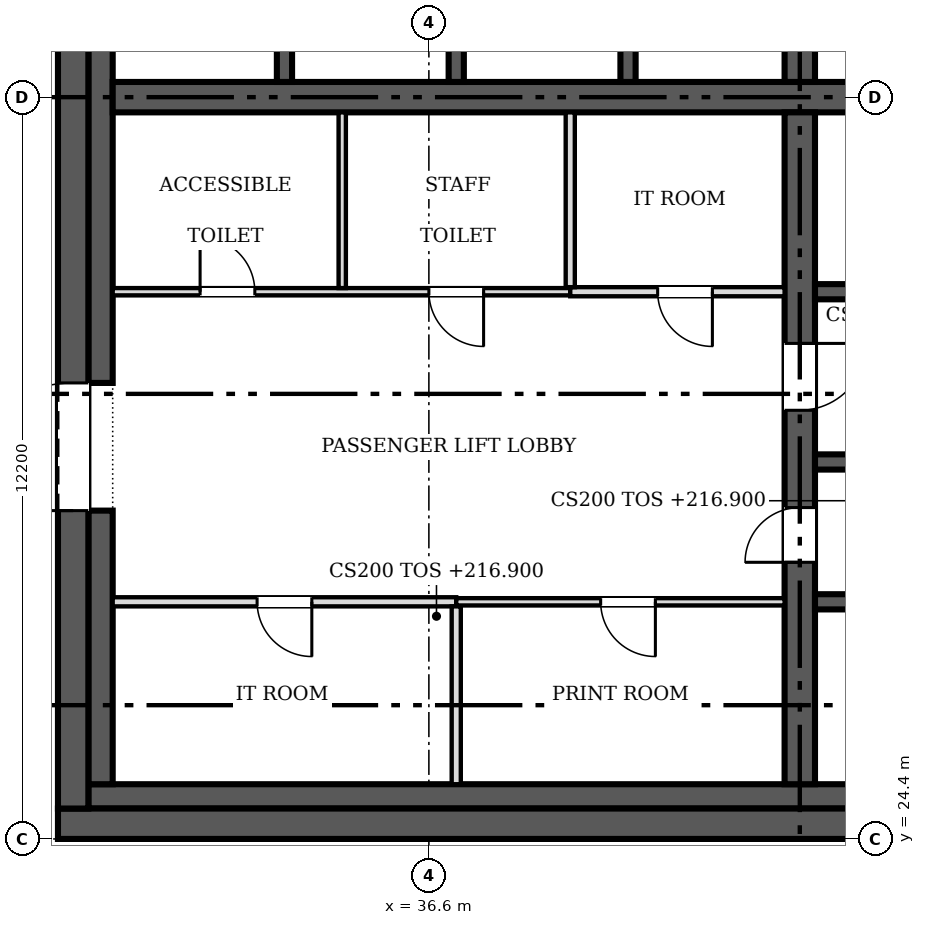
"""IFC4 building model, lengths in metres.
Left out: names, types, materials, properties, quantities, classifications, styles, units other than length and angle.
Written with IfcOpenShell. Run it as: python <this file> out.ifc"""

import sys

from ifc_helpers import new_model, si_unit, direction, frame, frame_2d, origin, place, context, subcontext, project, spatial, rectangle, extrude, source, transform, mapped, element, fill, save


model = new_model("IFC4")
c1 = context("Model", 3, precision=1e-05, world=origin(), true_north=direction((0.0, 1.0)))
c2 = subcontext(c1, "Body", "Model", "MODEL_VIEW")
j1 = project(units=[si_unit("LENGTHUNIT", "METRE"), si_unit("PLANEANGLEUNIT", "RADIAN")], contexts=[c1])
p1 = place(None, origin())
s1 = spatial("IfcSite", under=j1, at=p1, CompositionType="ELEMENT")
p2 = place(p1, origin())
s2 = spatial("IfcBuilding", under=s1, at=p2, CompositionType="ELEMENT")
p3 = place(p2, frame((0.0, 0.0, 216.9)))
s3 = spatial("IfcBuildingStorey", under=s2, at=p3, CompositionType="ELEMENT", Elevation=216.9)
p4 = place(p3, frame((54.9, 24.65, 0.0), z_axis=(0.0, 0.0, 1.0), x_axis=(-1.0, 0.0, 0.0)))
e1 = element("IfcWall", 1, at=p4, inside=s3, PredefinedType="SHEAR", context=c2, shape_type="SweptSolid", body=[
    extrude(rectangle(XDim=24.4, YDim=0.5, at=frame_2d((12.2, 0.0))), origin(), (0.0, 0.0, 1.0), 3.8),
])
m1 = source(origin(), c2, "Body", "SweptSolid", [
    extrude(rectangle(XDim=1.2, YDim=2.1, at=frame_2d((0.6, 1.05))), frame((0.0, 0.26, 0.0), z_axis=(0.0, -1.0, 0.0), x_axis=(1.0, 0.0, 0.0)), (0.0, 0.0, 1.0), 0.52),
])
p5 = place(p4, frame((1.5, 0.0, 0.0)))
e2 = element("IfcOpeningElement", 2, at=p5, cuts=e1, PredefinedType="OPENING", context=c2, shape_type="MappedRepresentation", body=[
    mapped(m1, transform((0.0, 0.0, 0.0), scale=1.0)),
])
p6 = place(p3, frame((30.75, 24.9, 0.0), z_axis=(0.0, 0.0, 1.0), x_axis=(0.0, 1.0, 0.0)))
e3 = element("IfcWall", 3, at=p6, inside=s3, PredefinedType="SHEAR", context=c2, shape_type="SweptSolid", body=[
    extrude(rectangle(XDim=23.4, YDim=0.5, at=frame_2d((11.7, 0.0))), origin(), (0.0, 0.0, 1.0), 3.8),
])
m2 = source(origin(), c2, "Body", "SweptSolid", [
    extrude(rectangle(XDim=2.1, YDim=2.4, at=frame_2d((1.05, 1.2))), frame((0.0, 0.26, 0.0), z_axis=(0.0, -1.0, 0.0), x_axis=(1.0, 0.0, 0.0)), (0.0, 0.0, 1.0), 0.52),
])
p7 = place(p6, frame((4.9, 0.0, 0.0)))
e4 = element("IfcOpeningElement", 4, at=p7, cuts=e3, PredefinedType="OPENING", context=c2, shape_type="MappedRepresentation", body=[
    mapped(m2, transform((0.0, 0.0, 0.0), scale=1.0)),
])
p8 = place(p6, frame((16.4, 0.0, 0.0)))
e5 = element("IfcOpeningElement", 5, at=p8, cuts=e3, PredefinedType="OPENING", context=c2, shape_type="MappedRepresentation", body=[
    mapped(m2, transform((0.0, 0.0, 0.0), scale=1.0)),
])
p9 = place(p3, frame((31.0, 25.1, 0.0), z_axis=(0.0, 0.0, 1.0), x_axis=(1.0, 0.0, 0.0)))
e6 = element("IfcWall", 6, at=p9, inside=s3, PredefinedType="SOLIDWALL", context=c2, shape_type="SweptSolid", body=[
    extrude(rectangle(XDim=21.2, YDim=0.4, at=frame_2d((10.6, 0.0))), origin(), (0.0, 0.0, 1.0), 3.8),
])
p10 = place(p3, frame((31.2, 25.3, 0.0), z_axis=(0.0, 0.0, 1.0), x_axis=(0.0, 1.0, 0.0)))
e7 = element("IfcWall", 7, at=p10, inside=s3, PredefinedType="SOLIDWALL", context=c2, shape_type="SweptSolid", body=[
    extrude(rectangle(XDim=4.5, YDim=0.4, at=frame_2d((2.25, 0.0))), origin(), (0.0, 0.0, 1.0), 3.8),
])
p11 = place(p3, frame((31.2, 31.9, 0.0), z_axis=(0.0, 0.0, 1.0), x_axis=(0.0, 1.0, 0.0)))
e8 = element("IfcWall", 8, at=p11, inside=s3, PredefinedType="SOLIDWALL", context=c2, shape_type="SweptSolid", body=[
    extrude(rectangle(XDim=9.4, YDim=0.4, at=frame_2d((4.7, 0.0))), origin(), (0.0, 0.0, 1.0), 3.8),
])
p12 = place(p3, frame((31.4, 36.6, 0.0), z_axis=(0.0, 0.0, 1.0), x_axis=(1.0, 0.0, 0.0)))
e9 = element("IfcWall", 9, at=p12, inside=s3, PredefinedType="SHEAR", context=c2, shape_type="SweptSolid", body=[
    extrude(rectangle(XDim=16.95, YDim=0.5, at=frame_2d((8.475, 0.0))), origin(), (0.0, 0.0, 1.0), 3.8),
])
p13 = place(p3, frame((42.7, 36.35, 0.0), z_axis=(0.0, 0.0, 1.0), x_axis=(0.0, -1.0, 0.0)))
e10 = element("IfcWall", 10, at=p13, inside=s3, PredefinedType="SHEAR", context=c2, shape_type="SweptSolid", body=[
    extrude(rectangle(XDim=11.05, YDim=0.5, at=frame_2d((5.525, 0.0))), origin(), (0.0, 0.0, 1.0), 3.8),
])
m3 = source(origin(), c2, "Body", "SweptSolid", [
    extrude(rectangle(XDim=0.9, YDim=2.1, at=frame_2d((0.45, 1.05))), frame((0.0, 0.26, 0.0), z_axis=(0.0, -1.0, 0.0), x_axis=(1.0, 0.0, 0.0)), (0.0, 0.0, 1.0), 0.52),
])
p14 = place(p13, frame((6.5, 0.0, 0.0)))
e11 = element("IfcOpeningElement", 11, at=p14, cuts=e10, PredefinedType="OPENING", context=c2, shape_type="MappedRepresentation", body=[
    mapped(m3, transform((0.0, 0.0, 0.0), scale=1.0)),
])
m4 = source(origin(), c2, "Body", "SweptSolid", [
    extrude(rectangle(XDim=1.1, YDim=2.1, at=frame_2d((0.55, 1.05))), frame((0.0, 0.26, 0.0), z_axis=(0.0, -1.0, 0.0), x_axis=(1.0, 0.0, 0.0)), (0.0, 0.0, 1.0), 0.52),
])
p15 = place(p13, frame((3.8, 0.0, 0.0)))
e12 = element("IfcOpeningElement", 12, at=p15, cuts=e10, PredefinedType="OPENING", context=c2, shape_type="MappedRepresentation", body=[
    mapped(m4, transform((0.0, 0.0, 0.0), scale=1.0)),
])
p16 = place(p3, frame((42.7, 36.85, 0.0), z_axis=(0.0, 0.0, 1.0), x_axis=(0.0, 1.0, 0.0)))
e13 = element("IfcWall", 13, at=p16, inside=s3, PredefinedType="SHEAR", context=c2, shape_type="SweptSolid", body=[
    extrude(rectangle(XDim=2.95, YDim=0.5, at=frame_2d((1.475, 0.0))), origin(), (0.0, 0.0, 1.0), 3.8),
])
p17 = place(p3, frame((48.225, 33.4, 0.0), z_axis=(0.0, 0.0, 1.0), x_axis=(-1.0, 0.0, 0.0)))
e14 = element("IfcWall", 14, at=p17, inside=s3, PredefinedType="SOLIDWALL", context=c2, shape_type="SweptSolid", body=[
    extrude(rectangle(XDim=5.275, YDim=0.25, at=frame_2d((2.638, 0.0))), origin(), (0.0, 0.0, 1.0), 3.8),
])
m5 = source(origin(), c2, "Body", "SweptSolid", [
    extrude(rectangle(XDim=1.2, YDim=2.1, at=frame_2d((0.6, 1.05))), frame((0.0, 0.135, 0.0), z_axis=(0.0, -1.0, 0.0), x_axis=(1.0, 0.0, 0.0)), (0.0, 0.0, 1.0), 0.27),
])
p18 = place(p17, frame((3.512, 0.0, 0.0)))
e15 = element("IfcOpeningElement", 15, at=p18, cuts=e14, PredefinedType="OPENING", context=c2, shape_type="MappedRepresentation", body=[
    mapped(m5, transform((0.0, 0.0, 0.0), scale=1.0)),
])
p19 = place(p17, frame((0.688, 0.0, 0.0)))
e16 = element("IfcOpeningElement", 16, at=p19, cuts=e14, PredefinedType="OPENING", context=c2, shape_type="MappedRepresentation", body=[
    mapped(m5, transform((0.0, 0.0, 0.0), scale=1.0)),
])
for number, where, z_axis, x_axis in (
    (17, (42.95, 28.3, 0.0), (0.0, 0.0, 1.0), (1.0, 0.0, 0.0)),
    (18, (42.95, 30.6, 0.0), (0.0, 0.0, 1.0), (1.0, 0.0, 0.0)),
):
    element("IfcWall", number, at=place(p3, frame(where, z_axis=z_axis, x_axis=x_axis)), inside=s3, PredefinedType="SOLIDWALL", context=c2, shape_type="SweptSolid", body=[
        extrude(rectangle(XDim=5.275, YDim=0.25, at=frame_2d((2.638, 0.0))), origin(), (0.0, 0.0, 1.0), 3.8),
    ])
for number, where, z_axis, x_axis in (
    (19, (34.225, 36.85, 0.0), (0.0, 0.0, 1.0), (0.0, 1.0, 0.0)),
    (20, (37.05, 36.85, 0.0), (0.0, 0.0, 1.0), (0.0, 1.0, 0.0)),
    (21, (39.875, 36.85, 0.0), (0.0, 0.0, 1.0), (0.0, 1.0, 0.0)),
):
    element("IfcWall", number, at=place(p3, frame(where, z_axis=z_axis, x_axis=x_axis)), inside=s3, PredefinedType="SOLIDWALL", context=c2, shape_type="SweptSolid", body=[
        extrude(rectangle(XDim=2.825, YDim=0.25, at=frame_2d((1.413, 0.0))), origin(), (0.0, 0.0, 1.0), 3.8),
    ])
p20 = place(p3, frame((31.4, 33.4, 0.0), z_axis=(0.0, 0.0, 1.0), x_axis=(1.0, 0.0, 0.0)))
e22 = element("IfcWall", 22, at=p20, inside=s3, PredefinedType="PARTITIONING", context=c2, shape_type="SweptSolid", body=[
    extrude(rectangle(XDim=7.525, YDim=0.12, at=frame_2d((3.763, 0.0))), origin(), (0.0, 0.0, 1.0), 3.6),
])
m6 = source(origin(), c2, "Body", "SweptSolid", [
    extrude(rectangle(XDim=0.9, YDim=2.1, at=frame_2d((0.45, 1.05))), frame((0.0, 0.07, 0.0), z_axis=(0.0, -1.0, 0.0), x_axis=(1.0, 0.0, 0.0)), (0.0, 0.0, 1.0), 0.14),
])
p21 = place(p20, frame((1.438, 0.0, 0.0)))
e23 = element("IfcOpeningElement", 23, at=p21, cuts=e22, PredefinedType="OPENING", context=c2, shape_type="MappedRepresentation", body=[
    mapped(m6, transform((0.0, 0.0, 0.0), scale=1.0)),
])
p22 = place(p20, frame((5.2, 0.0, 0.0)))
e24 = element("IfcOpeningElement", 24, at=p22, cuts=e22, PredefinedType="OPENING", context=c2, shape_type="MappedRepresentation", body=[
    mapped(m6, transform((0.0, 0.0, 0.0), scale=1.0)),
])
p23 = place(p3, frame((37.05, 28.3, 0.0), z_axis=(0.0, 0.0, 1.0), x_axis=(-1.0, 0.0, 0.0)))
e25 = element("IfcWall", 25, at=p23, inside=s3, PredefinedType="PARTITIONING", context=c2, shape_type="SweptSolid", body=[
    extrude(rectangle(XDim=5.65, YDim=0.15, at=frame_2d((2.825, 0.0))), origin(), (0.0, 0.0, 1.0), 3.6),
])
m7 = source(origin(), c2, "Body", "SweptSolid", [
    extrude(rectangle(XDim=0.9, YDim=2.1, at=frame_2d((0.45, 1.05))), frame((0.0, 0.085, 0.0), z_axis=(0.0, -1.0, 0.0), x_axis=(1.0, 0.0, 0.0)), (0.0, 0.0, 1.0), 0.17),
])
p24 = place(p23, frame((2.375, 0.0, 0.0)))
e26 = element("IfcOpeningElement", 26, at=p24, cuts=e25, PredefinedType="OPENING", context=c2, shape_type="MappedRepresentation", body=[
    mapped(m7, transform((0.0, 0.0, 0.0), scale=1.0)),
])
p25 = place(p3, frame((42.45, 28.3, 0.0), z_axis=(0.0, 0.0, 1.0), x_axis=(-1.0, 0.0, 0.0)))
e27 = element("IfcWall", 27, at=p25, inside=s3, PredefinedType="PARTITIONING", context=c2, shape_type="SweptSolid", body=[
    extrude(rectangle(XDim=5.4, YDim=0.12, at=frame_2d((2.7, 0.0))), origin(), (0.0, 0.0, 1.0), 3.6),
])
p26 = place(p25, frame((2.125, 0.0, 0.0)))
e28 = element("IfcOpeningElement", 28, at=p26, cuts=e27, PredefinedType="OPENING", context=c2, shape_type="MappedRepresentation", body=[
    mapped(m6, transform((0.0, 0.0, 0.0), scale=1.0)),
])
p27 = place(p3, frame((38.925, 33.4, 0.0), z_axis=(0.0, 0.0, 1.0), x_axis=(1.0, 0.0, 0.0)))
e29 = element("IfcWall", 29, at=p27, inside=s3, PredefinedType="PARTITIONING", context=c2, shape_type="SweptSolid", body=[
    extrude(rectangle(XDim=3.525, YDim=0.15, at=frame_2d((1.762, 0.0))), origin(), (0.0, 0.0, 1.0), 3.6),
])
p28 = place(p27, frame((1.438, 0.0, 0.0)))
e30 = element("IfcOpeningElement", 30, at=p28, cuts=e29, PredefinedType="OPENING", context=c2, shape_type="MappedRepresentation", body=[
    mapped(m7, transform((0.0, 0.0, 0.0), scale=1.0)),
])
p29 = place(p3, frame((35.175, 33.46, 0.0), z_axis=(0.0, 0.0, 1.0), x_axis=(0.0, 1.0, 0.0)))
e31 = element("IfcWall", 31, at=p29, inside=s3, PredefinedType="PARTITIONING", context=c2, shape_type="SweptSolid", body=[
    extrude(rectangle(XDim=2.89, YDim=0.12, at=frame_2d((1.445, 0.0))), origin(), (0.0, 0.0, 1.0), 3.6),
])
p30 = place(p3, frame((38.925, 33.475, 0.0), z_axis=(0.0, 0.0, 1.0), x_axis=(0.0, 1.0, 0.0)))
e32 = element("IfcWall", 32, at=p30, inside=s3, PredefinedType="PARTITIONING", context=c2, shape_type="SweptSolid", body=[
    extrude(rectangle(XDim=2.875, YDim=0.15, at=frame_2d((1.438, 0.0))), origin(), (0.0, 0.0, 1.0), 3.6),
])
p31 = place(p3, frame((37.05, 25.3, 0.0), z_axis=(0.0, 0.0, 1.0), x_axis=(0.0, 1.0, 0.0)))
e33 = element("IfcWall", 33, at=p31, inside=s3, PredefinedType="PARTITIONING", context=c2, shape_type="SweptSolid", body=[
    extrude(rectangle(XDim=2.925, YDim=0.15, at=frame_2d((1.462, 0.0))), origin(), (0.0, 0.0, 1.0), 3.6),
])
m8 = source(origin(), c2, "Body", "SweptSolid", [
    extrude(rectangle(XDim=2.1, YDim=2.4, at=frame_2d((1.05, 1.2))), frame((0.0, 0.025, 0.0), z_axis=(0.0, -1.0, 0.0), x_axis=(1.0, 0.0, 0.0)), (0.0, 0.0, 1.0), 0.05),
])
p32 = place(p7, origin())
e34 = element("IfcDoor", 34, at=p32, inside=s3, OperationType="DOUBLE_DOOR_SINGLE_SWING", PredefinedType="DOOR", context=c2, shape_type="MappedRepresentation", body=[
    mapped(m8, transform((0.0, 0.0, 0.0), scale=1.0)),
])
fill(e4, e34)
m9 = source(origin(), c2, "Body", "SweptSolid", [
    extrude(rectangle(XDim=0.9, YDim=2.1, at=frame_2d((0.45, 1.05))), frame((0.0, 0.025, 0.0), z_axis=(0.0, -1.0, 0.0), x_axis=(1.0, 0.0, 0.0)), (0.0, 0.0, 1.0), 0.05),
])
p33 = place(p14, origin())
e35 = element("IfcDoor", 35, at=p33, inside=s3, OperationType="SINGLE_SWING_RIGHT", PredefinedType="DOOR", context=c2, shape_type="MappedRepresentation", body=[
    mapped(m9, transform((0.0, 0.0, 0.0), scale=1.0)),
])
fill(e11, e35)
m10 = source(origin(), c2, "Body", "SweptSolid", [
    extrude(rectangle(XDim=1.1, YDim=2.1, at=frame_2d((0.55, 1.05))), frame((0.0, 0.025, 0.0), z_axis=(0.0, -1.0, 0.0), x_axis=(1.0, 0.0, 0.0)), (0.0, 0.0, 1.0), 0.05),
])
p34 = place(p15, origin())
e36 = element("IfcDoor", 36, at=p34, inside=s3, OperationType="SINGLE_SWING_LEFT", PredefinedType="DOOR", context=c2, shape_type="MappedRepresentation", body=[
    mapped(m10, transform((0.0, 0.0, 0.0), scale=1.0)),
])
fill(e12, e36)
p35 = place(p21, origin())
e37 = element("IfcDoor", 37, at=p35, inside=s3, OperationType="SINGLE_SWING_LEFT", PredefinedType="DOOR", context=c2, shape_type="MappedRepresentation", body=[
    mapped(m9, transform((0.0, 0.0, 0.0), scale=1.0)),
])
fill(e23, e37)
p36 = place(p22, origin())
e38 = element("IfcDoor", 38, at=p36, inside=s3, OperationType="SINGLE_SWING_RIGHT", PredefinedType="DOOR", context=c2, shape_type="MappedRepresentation", body=[
    mapped(m9, transform((0.0, 0.0, 0.0), scale=1.0)),
])
fill(e24, e38)
p37 = place(p24, origin())
e39 = element("IfcDoor", 39, at=p37, inside=s3, OperationType="SINGLE_SWING_LEFT", PredefinedType="DOOR", context=c2, shape_type="MappedRepresentation", body=[
    mapped(m9, transform((0.0, 0.0, 0.0), scale=1.0)),
])
fill(e26, e39)
p38 = place(p26, origin())
e40 = element("IfcDoor", 40, at=p38, inside=s3, OperationType="SINGLE_SWING_LEFT", PredefinedType="DOOR", context=c2, shape_type="MappedRepresentation", body=[
    mapped(m9, transform((0.0, 0.0, 0.0), scale=1.0)),
])
fill(e28, e40)
p39 = place(p28, origin())
e41 = element("IfcDoor", 41, at=p39, inside=s3, OperationType="SINGLE_SWING_RIGHT", PredefinedType="DOOR", context=c2, shape_type="MappedRepresentation", body=[
    mapped(m9, transform((0.0, 0.0, 0.0), scale=1.0)),
])
fill(e30, e41)
save(model, sys.argv[1])
